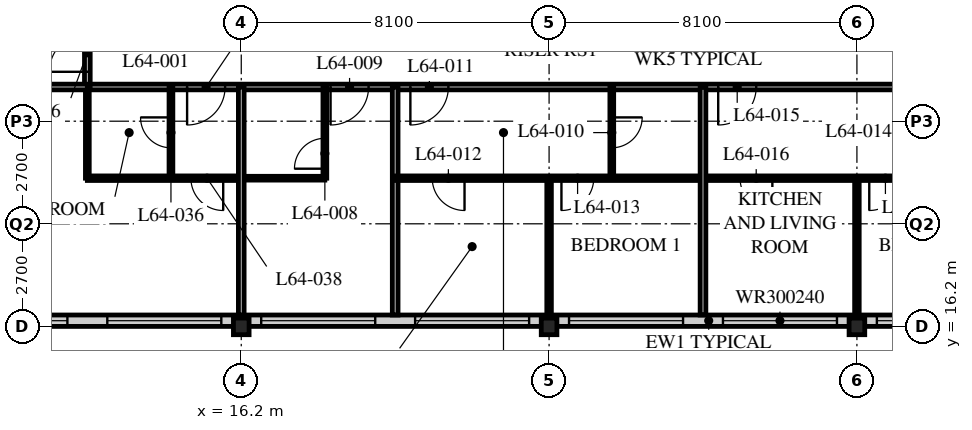
"""IFC4 building model, lengths in metres.
Left out: names, types, materials, properties, quantities, classifications, styles, units other than length and angle.
Written with IfcOpenShell. Run it as: python <this file> out.ifc"""

import sys

from ifc_helpers import new_model, si_unit, direction, frame, frame_2d, origin, origin_2d, place, context, subcontext, project, spatial, rectangle, i_section, extrude, element, fill, save


model = new_model("IFC4")
c1 = context("Model", 3, precision=1e-05, world=origin(), true_north=direction((0.0, 1.0)))
c2 = subcontext(c1, "Body", "Model", "MODEL_VIEW")
j1 = project(units=[si_unit("LENGTHUNIT", "METRE"), si_unit("PLANEANGLEUNIT", "RADIAN")], contexts=[c1])
p1 = place(None, origin())
s1 = spatial("IfcSite", under=j1, at=p1, CompositionType="ELEMENT")
p2 = place(p1, origin())
s2 = spatial("IfcBuilding", under=s1, at=p2, CompositionType="ELEMENT")
p3 = place(p2, frame((0.0, 0.0, 250.2)))
s3 = spatial("IfcBuildingStorey", under=s2, at=p3, CompositionType="ELEMENT", Elevation=250.2)
for number, where, z_axis, x_axis in (
    (1, (16.2, 16.2, 0.0), (0.0, 0.0, 1.0), (1.0, 0.0, 0.0)),
    (2, (24.3, 16.2, 0.0), (0.0, 0.0, 1.0), (1.0, 0.0, 0.0)),
    (3, (32.4, 16.2, 0.0), (0.0, 0.0, 1.0), (1.0, 0.0, 0.0)),
):
    element("IfcColumn", number, at=place(p3, frame(where, z_axis=z_axis, x_axis=x_axis)), inside=s3, PredefinedType="COLUMN", context=c2, shape_type="SweptSolid", body=[
        extrude(i_section(OverallWidth=0.412, OverallDepth=0.437, WebThickness=0.036, FlangeThickness=0.058, FilletRadius=0.015, at=origin_2d()), origin(), (0.0, 0.0, 1.0), 3.9),
    ])
p4 = place(p3, frame((8.4, 16.35, 0.0), z_axis=(0.0, 0.0, 1.0), x_axis=(1.0, 0.0, 0.0)))
e4 = element("IfcWall", 4, at=p4, inside=s3, PredefinedType="SOLIDWALL", context=c2, shape_type="SweptSolid", body=[
    extrude(rectangle(XDim=40.2, YDim=0.3, at=frame_2d((20.1, 0.0))), origin(), (0.0, 0.0, 1.0), 3.69),
])
p5 = place(p4, frame((0.225, 0.0, 0.6)))
e5 = element("IfcOpeningElement", 5, at=p5, cuts=e4, PredefinedType="OPENING", context=c2, shape_type="SweptSolid", body=[
    extrude(rectangle(XDim=3.0, YDim=2.4, at=frame_2d((1.5, 1.2))), frame((0.0, 0.16, 0.0), z_axis=(0.0, -1.0, 0.0), x_axis=(1.0, 0.0, 0.0)), (0.0, 0.0, 1.0), 0.32),
])
p6 = place(p4, frame((4.275, 0.0, 0.6)))
e6 = element("IfcOpeningElement", 6, at=p6, cuts=e4, PredefinedType="OPENING", context=c2, shape_type="SweptSolid", body=[
    extrude(rectangle(XDim=3.0, YDim=2.4, at=frame_2d((1.5, 1.2))), frame((0.0, 0.16, 0.0), z_axis=(0.0, -1.0, 0.0), x_axis=(1.0, 0.0, 0.0)), (0.0, 0.0, 1.0), 0.32),
])
p7 = place(p4, frame((8.325, 0.0, 0.6)))
e7 = element("IfcOpeningElement", 7, at=p7, cuts=e4, PredefinedType="OPENING", context=c2, shape_type="SweptSolid", body=[
    extrude(rectangle(XDim=3.0, YDim=2.4, at=frame_2d((1.5, 1.2))), frame((0.0, 0.16, 0.0), z_axis=(0.0, -1.0, 0.0), x_axis=(1.0, 0.0, 0.0)), (0.0, 0.0, 1.0), 0.32),
])
p8 = place(p4, frame((12.375, 0.0, 0.6)))
e8 = element("IfcOpeningElement", 8, at=p8, cuts=e4, PredefinedType="OPENING", context=c2, shape_type="SweptSolid", body=[
    extrude(rectangle(XDim=3.0, YDim=2.4, at=frame_2d((1.5, 1.2))), frame((0.0, 0.16, 0.0), z_axis=(0.0, -1.0, 0.0), x_axis=(1.0, 0.0, 0.0)), (0.0, 0.0, 1.0), 0.32),
])
p9 = place(p4, frame((16.425, 0.0, 0.6)))
e9 = element("IfcOpeningElement", 9, at=p9, cuts=e4, PredefinedType="OPENING", context=c2, shape_type="SweptSolid", body=[
    extrude(rectangle(XDim=3.0, YDim=2.4, at=frame_2d((1.5, 1.2))), frame((0.0, 0.16, 0.0), z_axis=(0.0, -1.0, 0.0), x_axis=(1.0, 0.0, 0.0)), (0.0, 0.0, 1.0), 0.32),
])
p10 = place(p4, frame((20.475, 0.0, 0.6)))
e10 = element("IfcOpeningElement", 10, at=p10, cuts=e4, PredefinedType="OPENING", context=c2, shape_type="SweptSolid", body=[
    extrude(rectangle(XDim=3.0, YDim=2.4, at=frame_2d((1.5, 1.2))), frame((0.0, 0.16, 0.0), z_axis=(0.0, -1.0, 0.0), x_axis=(1.0, 0.0, 0.0)), (0.0, 0.0, 1.0), 0.32),
])
p11 = place(p4, frame((24.525, 0.0, 0.6)))
e11 = element("IfcOpeningElement", 11, at=p11, cuts=e4, PredefinedType="OPENING", context=c2, shape_type="SweptSolid", body=[
    extrude(rectangle(XDim=3.0, YDim=2.4, at=frame_2d((1.5, 1.2))), frame((0.0, 0.16, 0.0), z_axis=(0.0, -1.0, 0.0), x_axis=(1.0, 0.0, 0.0)), (0.0, 0.0, 1.0), 0.32),
])
p12 = place(p4, frame((28.575, 0.0, 0.6)))
e12 = element("IfcOpeningElement", 12, at=p12, cuts=e4, PredefinedType="OPENING", context=c2, shape_type="SweptSolid", body=[
    extrude(rectangle(XDim=3.0, YDim=2.4, at=frame_2d((1.5, 1.2))), frame((0.0, 0.16, 0.0), z_axis=(0.0, -1.0, 0.0), x_axis=(1.0, 0.0, 0.0)), (0.0, 0.0, 1.0), 0.32),
])
p13 = place(p4, frame((32.625, 0.0, 0.6)))
e13 = element("IfcOpeningElement", 13, at=p13, cuts=e4, PredefinedType="OPENING", context=c2, shape_type="SweptSolid", body=[
    extrude(rectangle(XDim=3.0, YDim=2.4, at=frame_2d((1.5, 1.2))), frame((0.0, 0.16, 0.0), z_axis=(0.0, -1.0, 0.0), x_axis=(1.0, 0.0, 0.0)), (0.0, 0.0, 1.0), 0.32),
])
p14 = place(p4, frame((36.675, 0.0, 0.6)))
e14 = element("IfcOpeningElement", 14, at=p14, cuts=e4, PredefinedType="OPENING", context=c2, shape_type="SweptSolid", body=[
    extrude(rectangle(XDim=3.0, YDim=2.4, at=frame_2d((1.5, 1.2))), frame((0.0, 0.16, 0.0), z_axis=(0.0, -1.0, 0.0), x_axis=(1.0, 0.0, 0.0)), (0.0, 0.0, 1.0), 0.32),
])
p15 = place(p3, frame((12.15, 22.5, 0.0), z_axis=(0.0, 0.0, 1.0), x_axis=(1.0, 0.0, 0.0)))
e15 = element("IfcWall", 15, at=p15, inside=s3, PredefinedType="PARTITIONING", context=c2, shape_type="SweptSolid", body=[
    extrude(rectangle(XDim=24.3, YDim=0.15, at=frame_2d((12.15, 0.0))), origin(), (0.0, 0.0, 1.0), 3.69),
])
p16 = place(p15, frame((6.4, 0.0, 0.0)))
e16 = element("IfcOpeningElement", 16, at=p16, cuts=e15, PredefinedType="OPENING", context=c2, shape_type="SweptSolid", body=[
    extrude(rectangle(XDim=1.0, YDim=2.1, at=frame_2d((0.5, 1.05))), frame((0.0, 0.085, 0.0), z_axis=(0.0, -1.0, 0.0), x_axis=(1.0, 0.0, 0.0)), (0.0, 0.0, 1.0), 0.17),
])
p17 = place(p15, frame((8.5, 0.0, 0.0)))
e17 = element("IfcOpeningElement", 17, at=p17, cuts=e15, PredefinedType="OPENING", context=c2, shape_type="SweptSolid", body=[
    extrude(rectangle(XDim=1.0, YDim=2.1, at=frame_2d((0.5, 1.05))), frame((0.0, 0.085, 0.0), z_axis=(0.0, -1.0, 0.0), x_axis=(1.0, 0.0, 0.0)), (0.0, 0.0, 1.0), 0.17),
])
p18 = place(p15, frame((16.6, 0.0, 0.0)))
e18 = element("IfcOpeningElement", 18, at=p18, cuts=e15, PredefinedType="OPENING", context=c2, shape_type="SweptSolid", body=[
    extrude(rectangle(XDim=1.0, YDim=2.1, at=frame_2d((0.5, 1.05))), frame((0.0, 0.085, 0.0), z_axis=(0.0, -1.0, 0.0), x_axis=(1.0, 0.0, 0.0)), (0.0, 0.0, 1.0), 0.17),
])
p19 = place(p15, frame((2.625, 0.0, 0.0)))
e19 = element("IfcOpeningElement", 19, at=p19, cuts=e15, PredefinedType="OPENING", context=c2, shape_type="SweptSolid", body=[
    extrude(rectangle(XDim=1.0, YDim=2.1, at=frame_2d((0.5, 1.05))), frame((0.0, 0.085, 0.0), z_axis=(0.0, -1.0, 0.0), x_axis=(1.0, 0.0, 0.0)), (0.0, 0.0, 1.0), 0.17),
])
p20 = place(p3, frame((12.15, 22.5, 0.0), z_axis=(0.0, 0.0, 1.0), x_axis=(0.0, 1.0, 0.0)))
e20 = element("IfcWall", 20, at=p20, inside=s3, PredefinedType="PARTITIONING", context=c2, shape_type="SweptSolid", body=[
    extrude(rectangle(XDim=30.15, YDim=0.15, at=frame_2d((15.075, 0.0))), origin(), (0.0, 0.0, 1.0), 3.69),
])
p21 = place(p20, frame((0.4, 0.0, 0.0)))
e21 = element("IfcOpeningElement", 21, at=p21, cuts=e20, PredefinedType="OPENING", context=c2, shape_type="SweptSolid", body=[
    extrude(rectangle(XDim=1.0, YDim=2.1, at=frame_2d((0.5, 1.05))), frame((0.0, 0.085, 0.0), z_axis=(0.0, -1.0, 0.0), x_axis=(1.0, 0.0, 0.0)), (0.0, 0.0, 1.0), 0.17),
])
p22 = place(p20, frame((24.4, 0.0, 0.0)))
e22 = element("IfcOpeningElement", 22, at=p22, cuts=e20, PredefinedType="OPENING", context=c2, shape_type="SweptSolid", body=[
    extrude(rectangle(XDim=1.0, YDim=2.1, at=frame_2d((0.5, 1.05))), frame((0.0, 0.085, 0.0), z_axis=(0.0, -1.0, 0.0), x_axis=(1.0, 0.0, 0.0)), (0.0, 0.0, 1.0), 0.17),
])
p23 = place(p20, frame((28.45, 0.0, 0.0)))
e23 = element("IfcOpeningElement", 23, at=p23, cuts=e20, PredefinedType="OPENING", context=c2, shape_type="SweptSolid", body=[
    extrude(rectangle(XDim=1.0, YDim=2.1, at=frame_2d((0.5, 1.05))), frame((0.0, 0.085, 0.0), z_axis=(0.0, -1.0, 0.0), x_axis=(1.0, 0.0, 0.0)), (0.0, 0.0, 1.0), 0.17),
])
p24 = place(p3, frame((16.2, 20.1, 0.0), z_axis=(0.0, 0.0, 1.0), x_axis=(1.0, 0.0, 0.0)))
e24 = element("IfcWall", 24, at=p24, inside=s3, PredefinedType="PARTITIONING", context=c2, shape_type="SweptSolid", body=[
    extrude(rectangle(XDim=2.2, YDim=0.1, at=frame_2d((1.1, 0.0))), origin(), (0.0, 0.0, 1.0), 3.69),
])
p25 = place(p3, frame((18.4, 22.5, 0.0), z_axis=(0.0, 0.0, 1.0), x_axis=(0.0, -1.0, 0.0)))
e25 = element("IfcWall", 25, at=p25, inside=s3, PredefinedType="PARTITIONING", context=c2, shape_type="SweptSolid", body=[
    extrude(rectangle(XDim=2.4, YDim=0.1, at=frame_2d((1.2, 0.0))), origin(), (0.0, 0.0, 1.0), 3.69),
])
p26 = place(p25, frame((1.35, 0.0, 0.0)))
e26 = element("IfcOpeningElement", 26, at=p26, cuts=e25, PredefinedType="OPENING", context=c2, shape_type="SweptSolid", body=[
    extrude(rectangle(XDim=0.8, YDim=2.1, at=frame_2d((0.4, 1.05))), frame((0.0, 0.06, 0.0), z_axis=(0.0, -1.0, 0.0), x_axis=(1.0, 0.0, 0.0)), (0.0, 0.0, 1.0), 0.12),
])
p27 = place(p3, frame((20.25, 22.5, 0.0), z_axis=(0.0, 0.0, 1.0), x_axis=(0.0, -1.0, 0.0)))
e27 = element("IfcWall", 27, at=p27, inside=s3, PredefinedType="PARTITIONING", context=c2, shape_type="SweptSolid", body=[
    extrude(rectangle(XDim=6.0, YDim=0.15, at=frame_2d((3.0, 0.0))), origin(), (0.0, 0.0, 1.0), 3.69),
])
p28 = place(p3, frame((20.25, 20.1, 0.0), z_axis=(0.0, 0.0, 1.0), x_axis=(1.0, 0.0, 0.0)))
e28 = element("IfcWall", 28, at=p28, inside=s3, PredefinedType="PARTITIONING", context=c2, shape_type="SweptSolid", body=[
    extrude(rectangle(XDim=16.2, YDim=0.12, at=frame_2d((8.1, 0.0))), origin(), (0.0, 0.0, 1.0), 3.69),
])
p29 = place(p28, frame((0.975, 0.0, 0.0)))
e29 = element("IfcOpeningElement", 29, at=p29, cuts=e28, PredefinedType="OPENING", context=c2, shape_type="SweptSolid", body=[
    extrude(rectangle(XDim=0.85, YDim=2.1, at=frame_2d((0.425, 1.05))), frame((0.0, 0.07, 0.0), z_axis=(0.0, -1.0, 0.0), x_axis=(1.0, 0.0, 0.0)), (0.0, 0.0, 1.0), 0.14),
])
p30 = place(p28, frame((4.375, 0.0, 0.0)))
e30 = element("IfcOpeningElement", 30, at=p30, cuts=e28, PredefinedType="OPENING", context=c2, shape_type="SweptSolid", body=[
    extrude(rectangle(XDim=0.85, YDim=2.1, at=frame_2d((0.425, 1.05))), frame((0.0, 0.07, 0.0), z_axis=(0.0, -1.0, 0.0), x_axis=(1.0, 0.0, 0.0)), (0.0, 0.0, 1.0), 0.14),
])
p31 = place(p28, frame((9.075, 0.0, 0.0)))
e31 = element("IfcOpeningElement", 31, at=p31, cuts=e28, PredefinedType="OPENING", context=c2, shape_type="SweptSolid", body=[
    extrude(rectangle(XDim=0.85, YDim=2.1, at=frame_2d((0.425, 1.05))), frame((0.0, 0.07, 0.0), z_axis=(0.0, -1.0, 0.0), x_axis=(1.0, 0.0, 0.0)), (0.0, 0.0, 1.0), 0.14),
])
p32 = place(p28, frame((12.475, 0.0, 0.0)))
e32 = element("IfcOpeningElement", 32, at=p32, cuts=e28, PredefinedType="OPENING", context=c2, shape_type="SweptSolid", body=[
    extrude(rectangle(XDim=0.85, YDim=2.1, at=frame_2d((0.425, 1.05))), frame((0.0, 0.07, 0.0), z_axis=(0.0, -1.0, 0.0), x_axis=(1.0, 0.0, 0.0)), (0.0, 0.0, 1.0), 0.14),
])
p33 = place(p3, frame((25.95, 22.5, 0.0), z_axis=(0.0, 0.0, 1.0), x_axis=(0.0, -1.0, 0.0)))
e33 = element("IfcWall", 33, at=p33, inside=s3, PredefinedType="PARTITIONING", context=c2, shape_type="SweptSolid", body=[
    extrude(rectangle(XDim=2.4, YDim=0.1, at=frame_2d((1.2, 0.0))), origin(), (0.0, 0.0, 1.0), 3.69),
])
p34 = place(p33, frame((0.8, 0.0, 0.0)))
e34 = element("IfcOpeningElement", 34, at=p34, cuts=e33, PredefinedType="OPENING", context=c2, shape_type="SweptSolid", body=[
    extrude(rectangle(XDim=0.8, YDim=2.1, at=frame_2d((0.4, 1.05))), frame((0.0, 0.06, 0.0), z_axis=(0.0, -1.0, 0.0), x_axis=(1.0, 0.0, 0.0)), (0.0, 0.0, 1.0), 0.12),
])
p35 = place(p3, frame((24.3, 20.1, 0.0), z_axis=(0.0, 0.0, 1.0), x_axis=(0.0, -1.0, 0.0)))
e35 = element("IfcWall", 35, at=p35, inside=s3, PredefinedType="PARTITIONING", context=c2, shape_type="SweptSolid", body=[
    extrude(rectangle(XDim=3.6, YDim=0.12, at=frame_2d((1.8, 0.0))), origin(), (0.0, 0.0, 1.0), 3.078),
])
p36 = place(p3, frame((28.35, 22.5, 0.0), z_axis=(0.0, 0.0, 1.0), x_axis=(0.0, -1.0, 0.0)))
e36 = element("IfcWall", 36, at=p36, inside=s3, PredefinedType="PARTITIONING", context=c2, shape_type="SweptSolid", body=[
    extrude(rectangle(XDim=6.0, YDim=0.15, at=frame_2d((3.0, 0.0))), origin(), (0.0, 0.0, 1.0), 3.69),
])
p37 = place(p3, frame((32.4, 20.1, 0.0), z_axis=(0.0, 0.0, 1.0), x_axis=(0.0, -1.0, 0.0)))
e37 = element("IfcWall", 37, at=p37, inside=s3, PredefinedType="PARTITIONING", context=c2, shape_type="SweptSolid", body=[
    extrude(rectangle(XDim=3.6, YDim=0.12, at=frame_2d((1.8, 0.0))), origin(), (0.0, 0.0, 1.0), 3.078),
])
p38 = place(p3, frame((12.15, 20.1, 0.0), z_axis=(0.0, 0.0, 1.0), x_axis=(1.0, 0.0, 0.0)))
e38 = element("IfcWall", 38, at=p38, inside=s3, PredefinedType="PARTITIONING", context=c2, shape_type="SweptSolid", body=[
    extrude(rectangle(XDim=4.05, YDim=0.12, at=frame_2d((2.025, 0.0))), origin(), (0.0, 0.0, 1.0), 3.69),
])
p39 = place(p38, frame((2.725, 0.0, 0.0)))
e39 = element("IfcOpeningElement", 39, at=p39, cuts=e38, PredefinedType="OPENING", context=c2, shape_type="SweptSolid", body=[
    extrude(rectangle(XDim=0.85, YDim=2.1, at=frame_2d((0.425, 1.05))), frame((0.0, 0.07, 0.0), z_axis=(0.0, -1.0, 0.0), x_axis=(1.0, 0.0, 0.0)), (0.0, 0.0, 1.0), 0.14),
])
p40 = place(p3, frame((14.35, 22.5, 0.0), z_axis=(0.0, 0.0, 1.0), x_axis=(0.0, -1.0, 0.0)))
e40 = element("IfcWall", 40, at=p40, inside=s3, PredefinedType="PARTITIONING", context=c2, shape_type="SweptSolid", body=[
    extrude(rectangle(XDim=2.4, YDim=0.1, at=frame_2d((1.2, 0.0))), origin(), (0.0, 0.0, 1.0), 3.69),
])
p41 = place(p40, frame((0.8, 0.0, 0.0)))
e41 = element("IfcOpeningElement", 41, at=p41, cuts=e40, PredefinedType="OPENING", context=c2, shape_type="SweptSolid", body=[
    extrude(rectangle(XDim=0.8, YDim=2.1, at=frame_2d((0.4, 1.05))), frame((0.0, 0.06, 0.0), z_axis=(0.0, -1.0, 0.0), x_axis=(1.0, 0.0, 0.0)), (0.0, 0.0, 1.0), 0.12),
])
p42 = place(p3, frame((12.15, 22.5, 0.0), z_axis=(0.0, 0.0, 1.0), x_axis=(0.0, -1.0, 0.0)))
e42 = element("IfcWall", 42, at=p42, inside=s3, PredefinedType="PARTITIONING", context=c2, shape_type="SweptSolid", body=[
    extrude(rectangle(XDim=2.4, YDim=0.1, at=frame_2d((1.2, 0.0))), origin(), (0.0, 0.0, 1.0), 3.69),
])
p43 = place(p3, frame((4.35, 22.5, 0.0), z_axis=(0.0, 0.0, 1.0), x_axis=(1.0, 0.0, 0.0)))
e43 = element("IfcWall", 43, at=p43, inside=s3, PredefinedType="PARTITIONING", context=c2, shape_type="SweptSolid", body=[
    extrude(rectangle(XDim=7.8, YDim=0.15, at=frame_2d((3.9, 0.0))), origin(), (0.0, 0.0, 1.0), 3.69),
])
p44 = place(p3, frame((16.2, 22.5, 0.0), z_axis=(0.0, 0.0, 1.0), x_axis=(0.0, -1.0, 0.0)))
e44 = element("IfcWall", 44, at=p44, inside=s3, PredefinedType="PARTITIONING", context=c2, shape_type="SweptSolid", body=[
    extrude(rectangle(XDim=6.0, YDim=0.15, at=frame_2d((3.0, 0.0))), origin(), (0.0, 0.0, 1.0), 3.078),
])
p45 = place(p5, origin())
e45 = element("IfcWindow", 45, at=p45, inside=s3, PartitioningType="SINGLE_PANEL", PredefinedType="WINDOW", context=c2, shape_type="SweptSolid", body=[
    extrude(rectangle(XDim=3.0, YDim=2.4, at=frame_2d((1.5, 1.2))), frame((0.0, 0.03, 0.0), z_axis=(0.0, -1.0, 0.0), x_axis=(1.0, 0.0, 0.0)), (0.0, 0.0, 1.0), 0.06),
])
fill(e5, e45)
p46 = place(p6, origin())
e46 = element("IfcWindow", 46, at=p46, inside=s3, PartitioningType="SINGLE_PANEL", PredefinedType="WINDOW", context=c2, shape_type="SweptSolid", body=[
    extrude(rectangle(XDim=3.0, YDim=2.4, at=frame_2d((1.5, 1.2))), frame((0.0, 0.03, 0.0), z_axis=(0.0, -1.0, 0.0), x_axis=(1.0, 0.0, 0.0)), (0.0, 0.0, 1.0), 0.06),
])
fill(e6, e46)
p47 = place(p7, origin())
e47 = element("IfcWindow", 47, at=p47, inside=s3, PartitioningType="SINGLE_PANEL", PredefinedType="WINDOW", context=c2, shape_type="SweptSolid", body=[
    extrude(rectangle(XDim=3.0, YDim=2.4, at=frame_2d((1.5, 1.2))), frame((0.0, 0.03, 0.0), z_axis=(0.0, -1.0, 0.0), x_axis=(1.0, 0.0, 0.0)), (0.0, 0.0, 1.0), 0.06),
])
fill(e7, e47)
p48 = place(p8, origin())
e48 = element("IfcWindow", 48, at=p48, inside=s3, PartitioningType="SINGLE_PANEL", PredefinedType="WINDOW", context=c2, shape_type="SweptSolid", body=[
    extrude(rectangle(XDim=3.0, YDim=2.4, at=frame_2d((1.5, 1.2))), frame((0.0, 0.03, 0.0), z_axis=(0.0, -1.0, 0.0), x_axis=(1.0, 0.0, 0.0)), (0.0, 0.0, 1.0), 0.06),
])
fill(e8, e48)
p49 = place(p9, origin())
e49 = element("IfcWindow", 49, at=p49, inside=s3, PartitioningType="SINGLE_PANEL", PredefinedType="WINDOW", context=c2, shape_type="SweptSolid", body=[
    extrude(rectangle(XDim=3.0, YDim=2.4, at=frame_2d((1.5, 1.2))), frame((0.0, 0.03, 0.0), z_axis=(0.0, -1.0, 0.0), x_axis=(1.0, 0.0, 0.0)), (0.0, 0.0, 1.0), 0.06),
])
fill(e9, e49)
p50 = place(p10, origin())
e50 = element("IfcWindow", 50, at=p50, inside=s3, PartitioningType="SINGLE_PANEL", PredefinedType="WINDOW", context=c2, shape_type="SweptSolid", body=[
    extrude(rectangle(XDim=3.0, YDim=2.4, at=frame_2d((1.5, 1.2))), frame((0.0, 0.03, 0.0), z_axis=(0.0, -1.0, 0.0), x_axis=(1.0, 0.0, 0.0)), (0.0, 0.0, 1.0), 0.06),
])
fill(e10, e50)
p51 = place(p11, origin())
e51 = element("IfcWindow", 51, at=p51, inside=s3, PartitioningType="SINGLE_PANEL", PredefinedType="WINDOW", context=c2, shape_type="SweptSolid", body=[
    extrude(rectangle(XDim=3.0, YDim=2.4, at=frame_2d((1.5, 1.2))), frame((0.0, 0.03, 0.0), z_axis=(0.0, -1.0, 0.0), x_axis=(1.0, 0.0, 0.0)), (0.0, 0.0, 1.0), 0.06),
])
fill(e11, e51)
p52 = place(p26, origin())
e52 = element("IfcDoor", 52, at=p52, inside=s3, OperationType="SINGLE_SWING_LEFT", PredefinedType="DOOR", context=c2, shape_type="SweptSolid", body=[
    extrude(rectangle(XDim=0.8, YDim=2.1, at=frame_2d((0.4, 1.05))), frame((0.0, 0.025, 0.0), z_axis=(0.0, -1.0, 0.0), x_axis=(1.0, 0.0, 0.0)), (0.0, 0.0, 1.0), 0.05),
])
fill(e26, e52)
p53 = place(p16, origin())
e53 = element("IfcDoor", 53, at=p53, inside=s3, OperationType="SINGLE_SWING_RIGHT", PredefinedType="DOOR", context=c2, shape_type="SweptSolid", body=[
    extrude(rectangle(XDim=1.0, YDim=2.1, at=frame_2d((0.5, 1.05))), frame((0.0, 0.025, 0.0), z_axis=(0.0, -1.0, 0.0), x_axis=(1.0, 0.0, 0.0)), (0.0, 0.0, 1.0), 0.05),
])
fill(e16, e53)
p54 = place(p34, origin())
e54 = element("IfcDoor", 54, at=p54, inside=s3, OperationType="SINGLE_SWING_LEFT", PredefinedType="DOOR", context=c2, shape_type="SweptSolid", body=[
    extrude(rectangle(XDim=0.8, YDim=2.1, at=frame_2d((0.4, 1.05))), frame((0.0, 0.025, 0.0), z_axis=(0.0, -1.0, 0.0), x_axis=(1.0, 0.0, 0.0)), (0.0, 0.0, 1.0), 0.05),
])
fill(e34, e54)
p55 = place(p17, origin())
e55 = element("IfcDoor", 55, at=p55, inside=s3, OperationType="SINGLE_SWING_RIGHT", PredefinedType="DOOR", context=c2, shape_type="SweptSolid", body=[
    extrude(rectangle(XDim=1.0, YDim=2.1, at=frame_2d((0.5, 1.05))), frame((0.0, 0.025, 0.0), z_axis=(0.0, -1.0, 0.0), x_axis=(1.0, 0.0, 0.0)), (0.0, 0.0, 1.0), 0.05),
])
fill(e17, e55)
p56 = place(p29, origin())
e56 = element("IfcDoor", 56, at=p56, inside=s3, OperationType="SINGLE_SWING_LEFT", PredefinedType="DOOR", context=c2, shape_type="SweptSolid", body=[
    extrude(rectangle(XDim=0.85, YDim=2.1, at=frame_2d((0.425, 1.05))), frame((0.0, 0.025, 0.0), z_axis=(0.0, -1.0, 0.0), x_axis=(1.0, 0.0, 0.0)), (0.0, 0.0, 1.0), 0.05),
])
fill(e29, e56)
p57 = place(p30, origin())
e57 = element("IfcDoor", 57, at=p57, inside=s3, OperationType="SINGLE_SWING_RIGHT", PredefinedType="DOOR", context=c2, shape_type="SweptSolid", body=[
    extrude(rectangle(XDim=0.85, YDim=2.1, at=frame_2d((0.425, 1.05))), frame((0.0, 0.025, 0.0), z_axis=(0.0, -1.0, 0.0), x_axis=(1.0, 0.0, 0.0)), (0.0, 0.0, 1.0), 0.05),
])
fill(e30, e57)
p58 = place(p18, origin())
e58 = element("IfcDoor", 58, at=p58, inside=s3, OperationType="SINGLE_SWING_RIGHT", PredefinedType="DOOR", context=c2, shape_type="SweptSolid", body=[
    extrude(rectangle(XDim=1.0, YDim=2.1, at=frame_2d((0.5, 1.05))), frame((0.0, 0.025, 0.0), z_axis=(0.0, -1.0, 0.0), x_axis=(1.0, 0.0, 0.0)), (0.0, 0.0, 1.0), 0.05),
])
fill(e18, e58)
p59 = place(p31, origin())
e59 = element("IfcDoor", 59, at=p59, inside=s3, OperationType="SINGLE_SWING_LEFT", PredefinedType="DOOR", context=c2, shape_type="SweptSolid", body=[
    extrude(rectangle(XDim=0.85, YDim=2.1, at=frame_2d((0.425, 1.05))), frame((0.0, 0.025, 0.0), z_axis=(0.0, -1.0, 0.0), x_axis=(1.0, 0.0, 0.0)), (0.0, 0.0, 1.0), 0.05),
])
fill(e31, e59)
p60 = place(p32, origin())
e60 = element("IfcDoor", 60, at=p60, inside=s3, OperationType="SINGLE_SWING_RIGHT", PredefinedType="DOOR", context=c2, shape_type="SweptSolid", body=[
    extrude(rectangle(XDim=0.85, YDim=2.1, at=frame_2d((0.425, 1.05))), frame((0.0, 0.025, 0.0), z_axis=(0.0, -1.0, 0.0), x_axis=(1.0, 0.0, 0.0)), (0.0, 0.0, 1.0), 0.05),
])
fill(e32, e60)
p61 = place(p21, origin())
e61 = element("IfcDoor", 61, at=p61, inside=s3, OperationType="SINGLE_SWING_LEFT", PredefinedType="DOOR", context=c2, shape_type="SweptSolid", body=[
    extrude(rectangle(XDim=1.0, YDim=2.1, at=frame_2d((0.5, 1.05))), frame((0.0, 0.025, 0.0), z_axis=(0.0, -1.0, 0.0), x_axis=(1.0, 0.0, 0.0)), (0.0, 0.0, 1.0), 0.05),
])
fill(e21, e61)
p62 = place(p41, origin())
e62 = element("IfcDoor", 62, at=p62, inside=s3, OperationType="SINGLE_SWING_RIGHT", PredefinedType="DOOR", context=c2, shape_type="SweptSolid", body=[
    extrude(rectangle(XDim=0.8, YDim=2.1, at=frame_2d((0.4, 1.05))), frame((0.0, 0.025, 0.0), z_axis=(0.0, -1.0, 0.0), x_axis=(1.0, 0.0, 0.0)), (0.0, 0.0, 1.0), 0.05),
])
fill(e41, e62)
p63 = place(p19, origin())
e63 = element("IfcDoor", 63, at=p63, inside=s3, OperationType="SINGLE_SWING_RIGHT", PredefinedType="DOOR", context=c2, shape_type="SweptSolid", body=[
    extrude(rectangle(XDim=1.0, YDim=2.1, at=frame_2d((0.5, 1.05))), frame((0.0, 0.025, 0.0), z_axis=(0.0, -1.0, 0.0), x_axis=(1.0, 0.0, 0.0)), (0.0, 0.0, 1.0), 0.05),
])
fill(e19, e63)
p64 = place(p39, origin())
e64 = element("IfcDoor", 64, at=p64, inside=s3, OperationType="SINGLE_SWING_LEFT", PredefinedType="DOOR", context=c2, shape_type="SweptSolid", body=[
    extrude(rectangle(XDim=0.85, YDim=2.1, at=frame_2d((0.425, 1.05))), frame((0.0, 0.025, 0.0), z_axis=(0.0, -1.0, 0.0), x_axis=(1.0, 0.0, 0.0)), (0.0, 0.0, 1.0), 0.05),
])
fill(e39, e64)
save(model, sys.argv[1])
